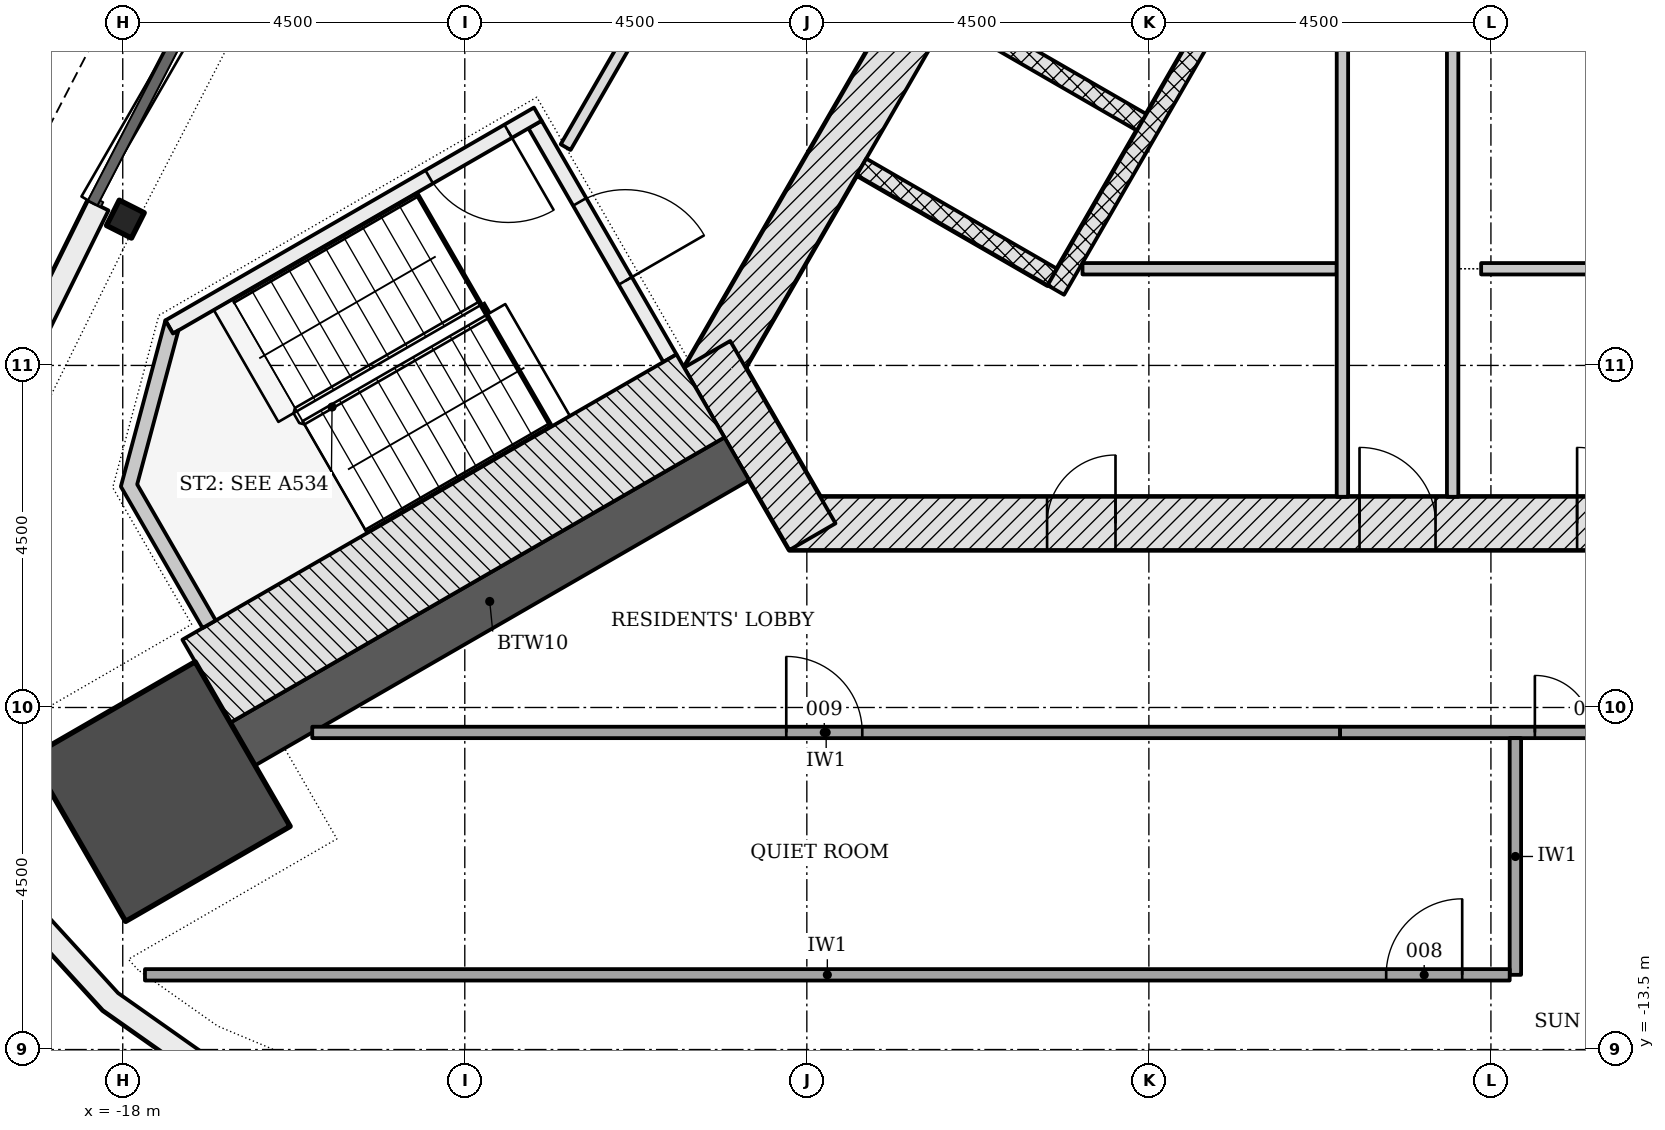
"""IFC4 building model, lengths in metres.
Left out: names, types, materials, properties, quantities, classifications, styles, units other than length and angle.
Written with IfcOpenShell. Run it as: python <this file> out.ifc"""

import sys

from ifc_helpers import new_model, si_unit, direction, frame, frame_2d, origin, origin_2d, place, context, subcontext, project, spatial, polyline, rectangle, i_section, outline, extrude, element, fill, save


model = new_model("IFC4")
c1 = context("Model", 3, precision=1e-05, world=origin(), true_north=direction((0.0, 1.0)))
c2 = subcontext(c1, "Body", "Model", "MODEL_VIEW")
j1 = project(units=[si_unit("LENGTHUNIT", "METRE"), si_unit("PLANEANGLEUNIT", "RADIAN")], contexts=[c1])
p1 = place(None, origin())
s1 = spatial("IfcSite", under=j1, at=p1, CompositionType="ELEMENT")
p2 = place(p1, origin())
s2 = spatial("IfcBuilding", under=s1, at=p2, CompositionType="ELEMENT")
p3 = place(p2, frame((0.0, 0.0, 232.8)))
s3 = spatial("IfcBuildingStorey", under=s2, at=p3, CompositionType="ELEMENT", Elevation=232.8)
p4 = place(p3, frame((-9.229, -6.578, -0.2), z_axis=(0.0, 0.0, 1.0), x_axis=(1.0, 0.0, 0.0)))
e1 = element("IfcWall", 1, at=p4, inside=s3, PredefinedType="SHEAR", context=c2, shape_type="SweptSolid", body=[
    extrude(rectangle(XDim=18.458, YDim=0.7, at=frame_2d((9.229, 0.0))), origin(), (0.0, 0.0, 1.0), 3.6),
])
p5 = place(p4, frame((7.5, 0.0, 0.2)))
e2 = element("IfcOpeningElement", 2, at=p5, cuts=e1, PredefinedType="OPENING", context=c2, shape_type="SweptSolid", body=[
    extrude(rectangle(XDim=1.0, YDim=2.1, at=frame_2d((0.5, 1.05))), frame((0.0, 0.36, 0.0), z_axis=(0.0, -1.0, 0.0), x_axis=(1.0, 0.0, 0.0)), (0.0, 0.0, 1.0), 0.72),
])
p6 = place(p4, frame((3.389, 0.0, 0.2)))
e3 = element("IfcOpeningElement", 3, at=p6, cuts=e1, PredefinedType="OPENING", context=c2, shape_type="SweptSolid", body=[
    extrude(rectangle(XDim=0.9, YDim=2.1, at=frame_2d((0.45, 1.05))), frame((0.0, 0.36, 0.0), z_axis=(0.0, -1.0, 0.0), x_axis=(1.0, 0.0, 0.0)), (0.0, 0.0, 1.0), 0.72),
])
p7 = place(p4, frame((10.363, 0.0, 0.2)))
e4 = element("IfcOpeningElement", 4, at=p7, cuts=e1, PredefinedType="OPENING", context=c2, shape_type="SweptSolid", body=[
    extrude(rectangle(XDim=1.0, YDim=2.1, at=frame_2d((0.5, 1.05))), frame((0.0, 0.36, 0.0), z_axis=(0.0, -1.0, 0.0), x_axis=(1.0, 0.0, 0.0)), (0.0, 0.0, 1.0), 0.72),
])
p8 = place(p4, frame((15.077, 0.0, 0.2)))
e5 = element("IfcOpeningElement", 5, at=p8, cuts=e1, PredefinedType="OPENING", context=c2, shape_type="SweptSolid", body=[
    extrude(rectangle(XDim=0.9, YDim=2.1, at=frame_2d((0.45, 1.05))), frame((0.0, 0.36, 0.0), z_axis=(0.0, -1.0, 0.0), x_axis=(1.0, 0.0, 0.0)), (0.0, 0.0, 1.0), 0.72),
])
p9 = place(p3, frame((10.311, -4.703, -0.2), z_axis=(0.0, 0.0, 1.0), x_axis=(-0.500001446645, 0.866024568562, 0.0)))
e6 = element("IfcWall", 6, at=p9, inside=s3, PredefinedType="SHEAR", context=c2, shape_type="SweptSolid", body=[
    extrude(rectangle(XDim=18.458, YDim=0.7, at=frame_2d((9.229, 0.0))), origin(), (0.0, 0.0, 1.0), 3.6),
])
p10 = place(p9, frame((4.379, 0.0, 0.2)))
e7 = element("IfcOpeningElement", 7, at=p10, cuts=e6, PredefinedType="OPENING", context=c2, shape_type="SweptSolid", body=[
    extrude(rectangle(XDim=1.1, YDim=2.1, at=frame_2d((0.55, 1.05))), frame((0.0, 0.36, 0.0), z_axis=(0.0, -1.0, 0.0), x_axis=(1.0, 0.0, 0.0)), (0.0, 0.0, 1.0), 0.72),
])
p11 = place(p9, frame((6.529, 0.0, 0.2)))
e8 = element("IfcOpeningElement", 8, at=p11, cuts=e6, PredefinedType="OPENING", context=c2, shape_type="SweptSolid", body=[
    extrude(rectangle(XDim=1.1, YDim=2.1, at=frame_2d((0.55, 1.05))), frame((0.0, 0.36, 0.0), z_axis=(0.0, -1.0, 0.0), x_axis=(1.0, 0.0, 0.0)), (0.0, 0.0, 1.0), 0.72),
])
p12 = place(p9, frame((8.679, 0.0, 0.2)))
e9 = element("IfcOpeningElement", 9, at=p12, cuts=e6, PredefinedType="OPENING", context=c2, shape_type="SweptSolid", body=[
    extrude(rectangle(XDim=1.1, YDim=2.1, at=frame_2d((0.55, 1.05))), frame((0.0, 0.36, 0.0), z_axis=(0.0, -1.0, 0.0), x_axis=(1.0, 0.0, 0.0)), (0.0, 0.0, 1.0), 0.72),
])
p13 = place(p9, frame((10.829, 0.0, 0.2)))
e10 = element("IfcOpeningElement", 10, at=p13, cuts=e6, PredefinedType="OPENING", context=c2, shape_type="SweptSolid", body=[
    extrude(rectangle(XDim=1.1, YDim=2.1, at=frame_2d((0.55, 1.05))), frame((0.0, 0.36, 0.0), z_axis=(0.0, -1.0, 0.0), x_axis=(1.0, 0.0, 0.0)), (0.0, 0.0, 1.0), 0.72),
])
p14 = place(p9, frame((12.979, 0.0, 0.2)))
e11 = element("IfcOpeningElement", 11, at=p14, cuts=e6, PredefinedType="OPENING", context=c2, shape_type="SweptSolid", body=[
    extrude(rectangle(XDim=1.1, YDim=2.1, at=frame_2d((0.55, 1.05))), frame((0.0, 0.36, 0.0), z_axis=(0.0, -1.0, 0.0), x_axis=(1.0, 0.0, 0.0)), (0.0, 0.0, 1.0), 0.72),
])
p15 = place(p3, frame((-1.083, 11.281, -0.2), z_axis=(0.0, 0.0, 1.0), x_axis=(-0.500001446645, -0.866024568562, 0.0)))
e12 = element("IfcWall", 12, at=p15, inside=s3, PredefinedType="SHEAR", context=c2, shape_type="SweptSolid", body=[
    extrude(rectangle(XDim=18.458, YDim=0.7, at=frame_2d((9.229, 0.0))), origin(), (0.0, 0.0, 1.0), 3.6),
])
p16 = place(p15, frame((8.979, 0.0, 0.2)))
e13 = element("IfcOpeningElement", 13, at=p16, cuts=e12, PredefinedType="OPENING", context=c2, shape_type="SweptSolid", body=[
    extrude(rectangle(XDim=1.2, YDim=2.1, at=frame_2d((0.6, 1.05))), frame((0.0, 0.36, 0.0), z_axis=(0.0, -1.0, 0.0), x_axis=(1.0, 0.0, 0.0)), (0.0, 0.0, 1.0), 0.72),
])
p17 = place(p15, frame((11.029, 0.0, 0.2)))
e14 = element("IfcOpeningElement", 14, at=p17, cuts=e12, PredefinedType="OPENING", context=c2, shape_type="SweptSolid", body=[
    extrude(rectangle(XDim=1.2, YDim=2.1, at=frame_2d((0.6, 1.05))), frame((0.0, 0.36, 0.0), z_axis=(0.0, -1.0, 0.0), x_axis=(1.0, 0.0, 0.0)), (0.0, 0.0, 1.0), 0.72),
])
p18 = place(p3, frame((-10.311, -4.353, -0.2), z_axis=(0.0, 0.0, 1.0), x_axis=(0.500042739161, -0.866000726912, 0.0)))
e15 = element("IfcWall", 15, at=p18, inside=s3, PredefinedType="SHEAR", context=c2, shape_type="SweptSolid", body=[
    extrude(rectangle(XDim=2.771, YDim=0.7, at=frame_2d((1.386, 0.0))), origin(), (0.0, 0.0, 1.0), 3.6),
])
p19 = place(p3, frame((-9.922, -5.728, -0.2), z_axis=(0.0, 0.0, 1.0), x_axis=(-0.866026891245, -0.499997423634, 0.0)))
e16 = element("IfcWall", 16, at=p19, inside=s3, PredefinedType="SHEAR", context=c2, shape_type="SweptSolid", body=[
    extrude(rectangle(XDim=7.506, YDim=0.65, at=frame_2d((3.753, 0.0))), origin(), (0.0, 0.0, 1.0), 3.6),
])
p20 = place(p3, frame((-17.505, -10.106, -0.2), z_axis=(0.0, 0.0, 1.0), x_axis=(-0.866025403784, -0.5, 0.0)))
e17 = element("IfcColumn", 17, at=p20, inside=s3, PredefinedType="COLUMN", context=c2, shape_type="SweptSolid", body=[
    extrude(rectangle(XDim=2.5, YDim=2.5, at=origin_2d()), origin(), (0.0, 0.0, 1.0), 3.6),
])
p21 = place(p3, frame((-17.965, -2.575, -0.2), z_axis=(0.0, 0.0, 1.0), x_axis=(-0.450184943726, -0.892935337212, 0.0)))
e18 = element("IfcColumn", 18, at=p21, inside=s3, PredefinedType="COLUMN", context=c2, shape_type="SweptSolid", body=[
    extrude(i_section(OverallWidth=0.373, OverallDepth=0.368, WebThickness=0.015, FlangeThickness=0.024, FilletRadius=0.015, at=origin_2d()), origin(), (0.0, 0.0, 1.0), 3.6),
])
p22 = place(p3, origin())
e19 = element("IfcWall", 19, at=p22, inside=s3, PredefinedType="NOTDEFINED", context=c2, shape_type="SweptSolid", body=[
    extrude(outline(polyline([(-18.457, -2.328), (-19.842, -5.13), (-20.323, -6.478), (-20.504, -7.898), (-20.375, -9.323), (-19.942, -10.687), (-19.227, -11.927), (-18.261, -12.983), (-17.092, -13.808), (-15.772, -14.361), (-14.364, -14.619), (-11.244, -14.82), (-11.225, -14.521), (-14.327, -14.32), (-15.686, -14.072), (-16.945, -13.544), (-18.062, -12.757), (-18.983, -11.748), (-19.666, -10.566), (-20.079, -9.264), (-20.202, -7.903), (-20.03, -6.548), (-19.565, -5.248), (-18.188, -2.46), (-18.457, -2.328)])), origin(), (0.0, 0.0, 1.0), 3.3),
])
p23 = place(p3, frame((5.87, -2.961, 0.0), z_axis=(0.0, 0.0, 1.0), x_axis=(-0.50000615651, 0.866021849293, 0.0)))
e20 = element("IfcWall", 20, at=p23, inside=s3, PredefinedType="PARTITIONING", context=c2, shape_type="SweptSolid", body=[
    extrude(rectangle(XDim=11.0, YDim=0.25, at=frame_2d((5.5, 0.0))), origin(), (0.0, 0.0, 1.0), 3.4),
])
for number, where, z_axis, x_axis in (
    (21, (-7.106, 0.148, -0.2), (0.0, 0.0, 1.0), (0.866, -0.5, 0.0)),
    (22, (-8.281, -1.887, -0.2), (0.0, 0.0, 1.0), (0.866, -0.5, 0.0)),
):
    element("IfcWall", number, at=place(p3, frame(where, z_axis=z_axis, x_axis=x_axis)), inside=s3, PredefinedType="PARTITIONING", context=c2, shape_type="SweptSolid", body=[
        extrude(rectangle(XDim=2.9, YDim=0.25, at=frame_2d((1.45, 0.0))), origin(), (0.0, 0.0, 1.0), 3.6),
    ])
p24 = place(p3, frame((-2.374, 2.294, 0.0), z_axis=(0.0, 0.0, 1.0), x_axis=(-0.500003174267, -0.866023571113, 0.0)))
e23 = element("IfcWall", 23, at=p24, inside=s3, PredefinedType="PARTITIONING", context=c2, shape_type="SweptSolid", body=[
    extrude(rectangle(XDim=6.7, YDim=0.25, at=frame_2d((3.35, 0.0))), origin(), (0.0, 0.0, 1.0), 3.4),
])
p25 = place(p3, frame((-5.373, -3.228, 0.0), z_axis=(0.0, 0.0, 1.0), x_axis=(1.0, 0.0, 0.0)))
e24 = element("IfcWall", 24, at=p25, inside=s3, PredefinedType="PARTITIONING", context=c2, shape_type="SweptSolid", body=[
    extrude(rectangle(XDim=3.344, YDim=0.15, at=frame_2d((1.672, 0.0))), origin(), (0.0, 0.0, 1.0), 3.4),
])
p26 = place(p3, frame((-1.954, 8.942, 0.0), z_axis=(0.0, 0.0, 1.0), x_axis=(0.0, -1.0, 0.0)))
e25 = element("IfcWall", 25, at=p26, inside=s3, PredefinedType="PARTITIONING", context=c2, shape_type="SweptSolid", body=[
    extrude(rectangle(XDim=15.171, YDim=0.15, at=frame_2d((7.585, 0.0))), origin(), (0.0, 0.0, 1.0), 3.4),
])
p27 = place(p26, frame((7.121, 0.0, 0.0)))
e26 = element("IfcOpeningElement", 26, at=p27, cuts=e25, PredefinedType="OPENING", context=c2, shape_type="SweptSolid", body=[
    extrude(rectangle(XDim=0.9, YDim=2.1, at=frame_2d((0.45, 1.05))), frame((0.0, 0.085, 0.0), z_axis=(0.0, -1.0, 0.0), x_axis=(1.0, 0.0, 0.0)), (0.0, 0.0, 1.0), 0.17),
])
p28 = place(p3, frame((-0.504, 5.897, 0.0), z_axis=(0.0, 0.0, 1.0), x_axis=(0.0, -1.0, 0.0)))
e27 = element("IfcWall", 27, at=p28, inside=s3, PredefinedType="PARTITIONING", context=c2, shape_type="SweptSolid", body=[
    extrude(rectangle(XDim=12.125, YDim=0.15, at=frame_2d((6.062, 0.0))), origin(), (0.0, 0.0, 1.0), 3.4),
])
p29 = place(p28, frame((4.114, 0.0, 0.0)))
e28 = element("IfcOpeningElement", 28, at=p29, cuts=e27, PredefinedType="OPENING", context=c2, shape_type="SweptSolid", body=[
    extrude(rectangle(XDim=0.9, YDim=2.1, at=frame_2d((0.45, 1.05))), frame((0.0, 0.085, 0.0), z_axis=(0.0, -1.0, 0.0), x_axis=(1.0, 0.0, 0.0)), (0.0, 0.0, 1.0), 0.17),
])
p30 = place(p3, frame((-0.129, -3.228, 0.0), z_axis=(0.0, 0.0, 1.0), x_axis=(1.0, 0.0, 0.0)))
e29 = element("IfcWall", 29, at=p30, inside=s3, PredefinedType="PARTITIONING", context=c2, shape_type="SweptSolid", body=[
    extrude(rectangle(XDim=9.139, YDim=0.15, at=frame_2d((4.57, 0.0))), origin(), (0.0, 0.0, 1.0), 3.4),
])
p31 = place(p3, frame((-12.576, -1.331, -0.2), z_axis=(0.0, 0.0, 1.0), x_axis=(0.499970499736, -0.8660424351, 0.0)))
e30 = element("IfcWall", 30, at=p31, inside=s3, PredefinedType="SHEAR", context=c2, shape_type="SweptSolid", body=[
    extrude(rectangle(XDim=3.55, YDim=0.2, at=frame_2d((1.775, 0.0))), origin(), (0.0, 0.0, 1.0), 3.6),
])
p32 = place(p31, frame((1.175, 0.0, 0.2)))
e31 = element("IfcOpeningElement", 31, at=p32, cuts=e30, PredefinedType="OPENING", context=c2, shape_type="SweptSolid", body=[
    extrude(rectangle(XDim=1.2, YDim=2.1, at=frame_2d((0.6, 1.05))), frame((0.0, 0.11, 0.0), z_axis=(0.0, -1.0, 0.0), x_axis=(1.0, 0.0, 0.0)), (0.0, 0.0, 1.0), 0.22),
])
p33 = place(p3, frame((-12.539, -1.194, -0.2), z_axis=(0.0, 0.0, 1.0), x_axis=(-0.866045472092, -0.499965239061, 0.0)))
e32 = element("IfcWall", 32, at=p33, inside=s3, PredefinedType="SHEAR", context=c2, shape_type="SweptSolid", body=[
    extrude(rectangle(XDim=5.6, YDim=0.2, at=frame_2d((2.8, 0.0))), origin(), (0.0, 0.0, 1.0), 3.6),
])
p34 = place(p33, frame((0.45, 0.0, 0.2)))
e33 = element("IfcOpeningElement", 33, at=p34, cuts=e32, PredefinedType="OPENING", context=c2, shape_type="SweptSolid", body=[
    extrude(rectangle(XDim=1.2, YDim=2.1, at=frame_2d((0.6, 1.05))), frame((0.0, 0.11, 0.0), z_axis=(0.0, -1.0, 0.0), x_axis=(1.0, 0.0, 0.0)), (0.0, 0.0, 1.0), 0.22),
])
p35 = place(p3, frame((-10.399, -4.901, -0.2), z_axis=(0.0, 0.0, 1.0), x_axis=(-0.866020939036, -0.500007733091, 0.0)))
e34 = element("IfcWall", 34, at=p35, inside=s3, PredefinedType="SHEAR", context=c2, shape_type="SweptSolid", body=[
    extrude(rectangle(XDim=7.507, YDim=1.261, at=frame_2d((3.753, 0.0))), origin(), (0.0, 0.0, 1.0), 3.6),
])
p36 = place(p3, frame((0.0, 0.0, -0.2)))
e35 = element("IfcWall", 35, at=p36, inside=s3, PredefinedType="SHEAR", context=c2, shape_type="SweptSolid", body=[
    extrude(outline(polyline([(-17.439, -3.907), (-18.025, -6.093), (-16.95, -7.955), (-16.777, -7.855), (-17.81, -6.065), (-17.267, -4.039), (-17.339, -4.081), (-17.339, -4.081), (-17.339, -4.081), (-17.339, -4.081), (-17.339, -4.081), (-17.339, -4.081), (-17.339, -4.081), (-17.339, -4.081), (-17.339, -4.081), (-17.339, -4.081), (-17.339, -4.081), (-17.339, -4.081), (-17.339, -4.081), (-17.339, -4.081), (-17.339, -4.081), (-17.339, -4.081), (-17.339, -4.081), (-17.439, -3.907)])), origin(), (0.0, 0.0, 1.0), 3.6),
])
p37 = place(p3, frame((-15.507, -9.328, 0.0), z_axis=(0.0, 0.0, 1.0), x_axis=(1.0, 0.0, 0.0)))
e36 = element("IfcWall", 36, at=p37, inside=s3, PredefinedType="PARTITIONING", context=c2, shape_type="SweptSolid", body=[
    extrude(rectangle(XDim=13.522, YDim=0.15, at=frame_2d((6.761, 0.0))), origin(), (0.0, 0.0, 1.0), 2.852),
])
p38 = place(p37, frame((6.236, 0.0, 0.0)))
e37 = element("IfcOpeningElement", 37, at=p38, cuts=e36, PredefinedType="OPENING", context=c2, shape_type="SweptSolid", body=[
    extrude(rectangle(XDim=1.0, YDim=2.1, at=frame_2d((0.5, 1.05))), frame((0.0, 0.085, 0.0), z_axis=(0.0, -1.0, 0.0), x_axis=(1.0, 0.0, 0.0)), (0.0, 0.0, 1.0), 0.17),
])
p39 = place(p3, frame((-1.984, -9.328, 0.0), z_axis=(0.0, 0.0, 1.0), x_axis=(1.0, 0.0, 0.0)))
e38 = element("IfcWall", 38, at=p39, inside=s3, PredefinedType="PARTITIONING", context=c2, shape_type="SweptSolid", body=[
    extrude(rectangle(XDim=4.369, YDim=0.15, at=frame_2d((2.184, 0.0))), origin(), (0.0, 0.0, 1.0), 2.852),
])
p40 = place(p39, frame((2.562, 0.0, 0.0)))
e39 = element("IfcOpeningElement", 39, at=p40, cuts=e38, PredefinedType="OPENING", context=c2, shape_type="SweptSolid", body=[
    extrude(rectangle(XDim=1.5, YDim=2.1, at=frame_2d((0.75, 1.05))), frame((0.0, 0.085, 0.0), z_axis=(0.0, -1.0, 0.0), x_axis=(1.0, 0.0, 0.0)), (0.0, 0.0, 1.0), 0.17),
])
p41 = place(p3, frame((0.322, -9.403, 0.0), z_axis=(0.0, 0.0, 1.0), x_axis=(0.0, -1.0, 0.0)))
e40 = element("IfcWall", 40, at=p41, inside=s3, PredefinedType="PARTITIONING", context=c2, shape_type="SweptSolid", body=[
    extrude(rectangle(XDim=3.114, YDim=0.15, at=frame_2d((1.557, 0.0))), origin(), (0.0, 0.0, 1.0), 3.4),
])
p42 = place(p3, frame((-17.708, -12.517, 0.0), z_axis=(0.0, 0.0, 1.0), x_axis=(1.0, 0.0, 0.0)))
e41 = element("IfcWall", 41, at=p42, inside=s3, PredefinedType="PARTITIONING", context=c2, shape_type="SweptSolid", body=[
    extrude(rectangle(XDim=17.955, YDim=0.15, at=frame_2d((8.978, 0.0))), origin(), (0.0, 0.0, 1.0), 2.852),
])
p43 = place(p42, frame((16.33, 0.0, 0.0)))
e42 = element("IfcOpeningElement", 42, at=p43, cuts=e41, PredefinedType="OPENING", context=c2, shape_type="SweptSolid", body=[
    extrude(rectangle(XDim=1.0, YDim=2.1, at=frame_2d((0.5, 1.05))), frame((0.0, 0.085, 0.0), z_axis=(0.0, -1.0, 0.0), x_axis=(1.0, 0.0, 0.0)), (0.0, 0.0, 1.0), 0.17),
])
p44 = place(p3, frame((-9.619, 2.795, 0.0), z_axis=(0.0, 0.0, 1.0), x_axis=(-0.499963809755, -0.866046297224, 0.0)))
e43 = element("IfcWall", 43, at=p44, inside=s3, PredefinedType="PARTITIONING", context=c2, shape_type="SweptSolid", body=[
    extrude(rectangle(XDim=5.108, YDim=0.15, at=frame_2d((2.554, 0.0))), origin(), (0.0, 0.0, 1.0), 2.852),
])
p45 = place(p5, origin())
e44 = element("IfcDoor", 44, at=p45, inside=s3, OperationType="SINGLE_SWING_LEFT", PredefinedType="DOOR", context=c2, shape_type="SweptSolid", body=[
    extrude(rectangle(XDim=1.0, YDim=2.1, at=frame_2d((0.5, 1.05))), frame((0.0, 0.075, 0.0), z_axis=(0.0, -1.0, 0.0), x_axis=(1.0, 0.0, 0.0)), (0.0, 0.0, 1.0), 0.15),
])
fill(e2, e44)
p46 = place(p6, origin())
e45 = element("IfcDoor", 45, at=p46, inside=s3, OperationType="SINGLE_SWING_RIGHT", PredefinedType="DOOR", context=c2, shape_type="SweptSolid", body=[
    extrude(rectangle(XDim=0.9, YDim=2.1, at=frame_2d((0.45, 1.05))), frame((0.0, 0.075, 0.0), z_axis=(0.0, -1.0, 0.0), x_axis=(1.0, 0.0, 0.0)), (0.0, 0.0, 1.0), 0.15),
])
fill(e3, e45)
p47 = place(p7, origin())
e46 = element("IfcDoor", 46, at=p47, inside=s3, OperationType="SINGLE_SWING_LEFT", PredefinedType="DOOR", context=c2, shape_type="SweptSolid", body=[
    extrude(rectangle(XDim=1.0, YDim=2.1, at=frame_2d((0.5, 1.05))), frame((0.0, 0.075, 0.0), z_axis=(0.0, -1.0, 0.0), x_axis=(1.0, 0.0, 0.0)), (0.0, 0.0, 1.0), 0.15),
])
fill(e4, e46)
p48 = place(p32, origin())
e47 = element("IfcDoor", 47, at=p48, inside=s3, OperationType="SINGLE_SWING_RIGHT", PredefinedType="DOOR", context=c2, shape_type="SweptSolid", body=[
    extrude(rectangle(XDim=1.2, YDim=2.1, at=frame_2d((0.6, 1.05))), frame((0.0, 0.025, 0.0), z_axis=(0.0, -1.0, 0.0), x_axis=(1.0, 0.0, 0.0)), (0.0, 0.0, 1.0), 0.05),
])
fill(e31, e47)
p49 = place(p34, origin())
e48 = element("IfcDoor", 48, at=p49, inside=s3, OperationType="SINGLE_SWING_LEFT", PredefinedType="DOOR", context=c2, shape_type="SweptSolid", body=[
    extrude(rectangle(XDim=1.2, YDim=2.1, at=frame_2d((0.6, 1.05))), frame((0.0, 0.025, 0.0), z_axis=(0.0, -1.0, 0.0), x_axis=(1.0, 0.0, 0.0)), (0.0, 0.0, 1.0), 0.05),
])
fill(e33, e48)
p50 = place(p40, origin())
e49 = element("IfcDoor", 49, at=p50, inside=s3, OperationType="DOUBLE_DOOR_SINGLE_SWING", PredefinedType="DOOR", context=c2, shape_type="SweptSolid", body=[
    extrude(rectangle(XDim=1.5, YDim=2.1, at=frame_2d((0.75, 1.05))), frame((0.0, 0.025, 0.0), z_axis=(0.0, -1.0, 0.0), x_axis=(1.0, 0.0, 0.0)), (0.0, 0.0, 1.0), 0.05),
])
fill(e39, e49)
p51 = place(p43, origin())
e50 = element("IfcDoor", 50, at=p51, inside=s3, OperationType="SINGLE_SWING_RIGHT", PredefinedType="DOOR", context=c2, shape_type="SweptSolid", body=[
    extrude(rectangle(XDim=1.0, YDim=2.1, at=frame_2d((0.5, 1.05))), frame((0.0, 0.025, 0.0), z_axis=(0.0, -1.0, 0.0), x_axis=(1.0, 0.0, 0.0)), (0.0, 0.0, 1.0), 0.05),
])
fill(e42, e50)
p52 = place(p38, origin())
e51 = element("IfcDoor", 51, at=p52, inside=s3, OperationType="SINGLE_SWING_LEFT", PredefinedType="DOOR", context=c2, shape_type="SweptSolid", body=[
    extrude(rectangle(XDim=1.0, YDim=2.1, at=frame_2d((0.5, 1.05))), frame((0.0, 0.025, 0.0), z_axis=(0.0, -1.0, 0.0), x_axis=(1.0, 0.0, 0.0)), (0.0, 0.0, 1.0), 0.05),
])
fill(e37, e51)
save(model, sys.argv[1])
